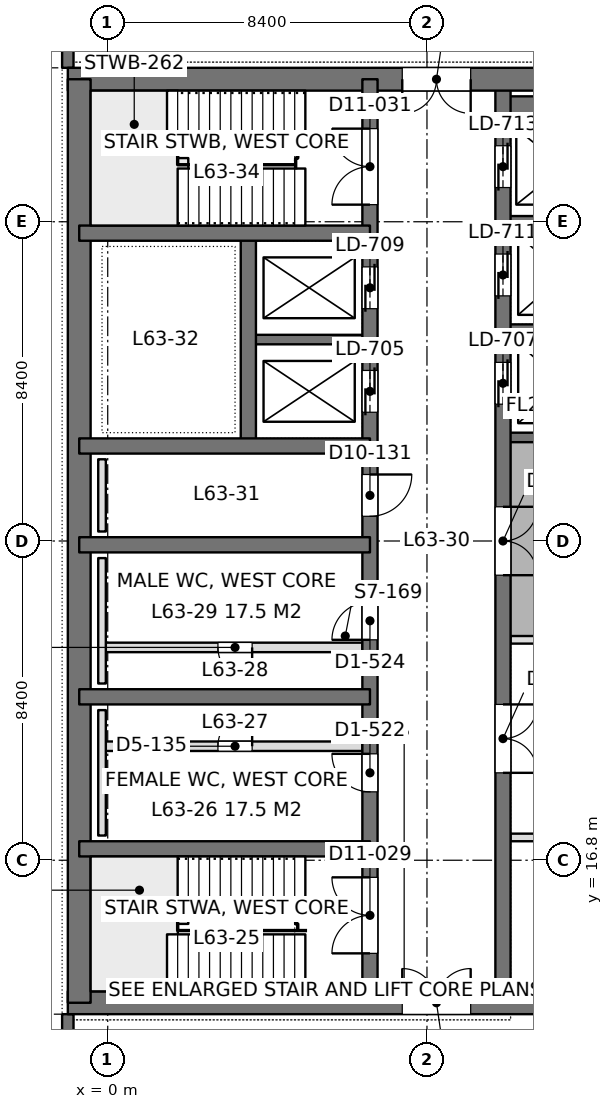
"""IFC4 building model, lengths in metres.
Left out: names, types, materials, properties, quantities, classifications, styles, units other than length and angle.
Written with IfcOpenShell. Run it as: python <this file> out.ifc"""

import sys

from ifc_helpers import new_model, si_unit, direction, frame, frame_2d, origin, place, context, subcontext, project, spatial, rectangle, extrude, element, fill, save


model = new_model("IFC4")
c1 = context("Model", 3, precision=1e-05, world=origin(), true_north=direction((0.0, 1.0)))
c2 = subcontext(c1, "Body", "Model", "MODEL_VIEW")
j1 = project(units=[si_unit("LENGTHUNIT", "METRE"), si_unit("PLANEANGLEUNIT", "RADIAN")], contexts=[c1])
p1 = place(None, origin())
s1 = spatial("IfcSite", under=j1, at=p1, CompositionType="ELEMENT")
p2 = place(p1, origin())
s2 = spatial("IfcBuilding", under=s1, at=p2, CompositionType="ELEMENT")
p3 = place(p2, frame((0.0, 0.0, 277.2)))
s3 = spatial("IfcBuildingStorey", under=s2, at=p3, CompositionType="ELEMENT", Elevation=277.2)
p4 = place(p3, frame((-1.05, 13.05, 0.0), z_axis=(0.0, 0.0, 1.0), x_axis=(1.0, 0.0, 0.0)))
e1 = element("IfcWall", 1, at=p4, inside=s3, PredefinedType="SHEAR", context=c2, shape_type="SweptSolid", body=[
    extrude(rectangle(XDim=17.7, YDim=0.6, at=frame_2d((8.85, 0.0))), origin(), (0.0, 0.0, 1.0), 4.5),
])
p5 = place(p4, frame((8.8, 0.0, 0.0)))
e2 = element("IfcOpeningElement", 2, at=p5, cuts=e1, PredefinedType="OPENING", context=c2, shape_type="SweptSolid", body=[
    extrude(rectangle(XDim=1.8, YDim=2.4, at=frame_2d((0.9, 1.2))), frame((0.0, 0.31, 0.0), z_axis=(0.0, -1.0, 0.0), x_axis=(1.0, 0.0, 0.0)), (0.0, 0.0, 1.0), 0.62),
])
p6 = place(p3, frame((-1.05, 37.35, 0.0), z_axis=(0.0, 0.0, 1.0), x_axis=(1.0, 0.0, 0.0)))
e3 = element("IfcWall", 3, at=p6, inside=s3, PredefinedType="SHEAR", context=c2, shape_type="SweptSolid", body=[
    extrude(rectangle(XDim=17.7, YDim=0.6, at=frame_2d((8.85, 0.0))), origin(), (0.0, 0.0, 1.0), 4.5),
])
p7 = place(p6, frame((8.8, 0.0, 0.0)))
e4 = element("IfcOpeningElement", 4, at=p7, cuts=e3, PredefinedType="OPENING", context=c2, shape_type="SweptSolid", body=[
    extrude(rectangle(XDim=1.8, YDim=2.4, at=frame_2d((0.9, 1.2))), frame((0.0, 0.31, 0.0), z_axis=(0.0, -1.0, 0.0), x_axis=(1.0, 0.0, 0.0)), (0.0, 0.0, 1.0), 0.62),
])
p8 = place(p3, frame((-0.75, 13.05, 0.0), z_axis=(0.0, 0.0, 1.0), x_axis=(0.0, 1.0, 0.0)))
e5 = element("IfcWall", 5, at=p8, inside=s3, PredefinedType="SHEAR", context=c2, shape_type="SweptSolid", body=[
    extrude(rectangle(XDim=24.3, YDim=0.6, at=frame_2d((12.15, 0.0))), origin(), (0.0, 0.0, 1.0), 4.5),
])
p9 = place(p3, frame((6.9, 13.05, 0.0), z_axis=(0.0, 0.0, 1.0), x_axis=(0.0, 1.0, 0.0)))
e6 = element("IfcWall", 6, at=p9, inside=s3, PredefinedType="SHEAR", context=c2, shape_type="SweptSolid", body=[
    extrude(rectangle(XDim=24.3, YDim=0.4, at=frame_2d((12.15, 0.0))), origin(), (0.0, 0.0, 1.0), 4.5),
])
p10 = place(p9, frame((1.3, 0.0, 0.0)))
e7 = element("IfcOpeningElement", 7, at=p10, cuts=e6, PredefinedType="OPENING", context=c2, shape_type="SweptSolid", body=[
    extrude(rectangle(XDim=2.0, YDim=2.2, at=frame_2d((1.0, 1.1))), frame((0.0, 0.21, 0.0), z_axis=(0.0, -1.0, 0.0), x_axis=(1.0, 0.0, 0.0)), (0.0, 0.0, 1.0), 0.42),
])
p11 = place(p9, frame((21.0, 0.0, 0.0)))
e8 = element("IfcOpeningElement", 8, at=p11, cuts=e6, PredefinedType="OPENING", context=c2, shape_type="SweptSolid", body=[
    extrude(rectangle(XDim=2.0, YDim=2.2, at=frame_2d((1.0, 1.1))), frame((0.0, 0.21, 0.0), z_axis=(0.0, -1.0, 0.0), x_axis=(1.0, 0.0, 0.0)), (0.0, 0.0, 1.0), 0.42),
])
p12 = place(p9, frame((5.55, 0.0, 0.0)))
e9 = element("IfcOpeningElement", 9, at=p12, cuts=e6, PredefinedType="OPENING", context=c2, shape_type="SweptSolid", body=[
    extrude(rectangle(XDim=1.0, YDim=2.2, at=frame_2d((0.5, 1.1))), frame((0.0, 0.21, 0.0), z_axis=(0.0, -1.0, 0.0), x_axis=(1.0, 0.0, 0.0)), (0.0, 0.0, 1.0), 0.42),
])
p13 = place(p9, frame((9.55, 0.0, 0.0)))
e10 = element("IfcOpeningElement", 10, at=p13, cuts=e6, PredefinedType="OPENING", context=c2, shape_type="SweptSolid", body=[
    extrude(rectangle(XDim=1.0, YDim=2.2, at=frame_2d((0.5, 1.1))), frame((0.0, 0.21, 0.0), z_axis=(0.0, -1.0, 0.0), x_axis=(1.0, 0.0, 0.0)), (0.0, 0.0, 1.0), 0.42),
])
p14 = place(p9, frame((12.8, 0.0, 0.0)))
e11 = element("IfcOpeningElement", 11, at=p14, cuts=e6, PredefinedType="OPENING", context=c2, shape_type="SweptSolid", body=[
    extrude(rectangle(XDim=1.1, YDim=2.2, at=frame_2d((0.55, 1.1))), frame((0.0, 0.21, 0.0), z_axis=(0.0, -1.0, 0.0), x_axis=(1.0, 0.0, 0.0)), (0.0, 0.0, 1.0), 0.42),
])
p15 = place(p9, frame((15.538, 0.0, 0.0)))
e12 = element("IfcOpeningElement", 12, at=p15, cuts=e6, PredefinedType="OPENING", context=c2, shape_type="SweptSolid", body=[
    extrude(rectangle(XDim=1.1, YDim=2.2, at=frame_2d((0.55, 1.1))), frame((0.0, 0.21, 0.0), z_axis=(0.0, -1.0, 0.0), x_axis=(1.0, 0.0, 0.0)), (0.0, 0.0, 1.0), 0.42),
])
p16 = place(p9, frame((18.262, 0.0, 0.0)))
e13 = element("IfcOpeningElement", 13, at=p16, cuts=e6, PredefinedType="OPENING", context=c2, shape_type="SweptSolid", body=[
    extrude(rectangle(XDim=1.1, YDim=2.2, at=frame_2d((0.55, 1.1))), frame((0.0, 0.21, 0.0), z_axis=(0.0, -1.0, 0.0), x_axis=(1.0, 0.0, 0.0)), (0.0, 0.0, 1.0), 0.42),
])
p17 = place(p3, frame((10.4, 13.05, 0.0), z_axis=(0.0, 0.0, 1.0), x_axis=(0.0, 1.0, 0.0)))
e14 = element("IfcWall", 14, at=p17, inside=s3, PredefinedType="SHEAR", context=c2, shape_type="SweptSolid", body=[
    extrude(rectangle(XDim=24.3, YDim=0.4, at=frame_2d((12.15, 0.0))), origin(), (0.0, 0.0, 1.0), 4.5),
])
p18 = place(p17, frame((15.75, 0.0, 0.0)))
e15 = element("IfcOpeningElement", 15, at=p18, cuts=e14, PredefinedType="OPENING", context=c2, shape_type="SweptSolid", body=[
    extrude(rectangle(XDim=1.1, YDim=2.2, at=frame_2d((0.55, 1.1))), frame((0.0, 0.21, 0.0), z_axis=(0.0, -1.0, 0.0), x_axis=(1.0, 0.0, 0.0)), (0.0, 0.0, 1.0), 0.42),
])
p19 = place(p17, frame((18.6, 0.0, 0.0)))
e16 = element("IfcOpeningElement", 16, at=p19, cuts=e14, PredefinedType="OPENING", context=c2, shape_type="SweptSolid", body=[
    extrude(rectangle(XDim=1.1, YDim=2.2, at=frame_2d((0.55, 1.1))), frame((0.0, 0.21, 0.0), z_axis=(0.0, -1.0, 0.0), x_axis=(1.0, 0.0, 0.0)), (0.0, 0.0, 1.0), 0.42),
])
p20 = place(p17, frame((21.45, 0.0, 0.0)))
e17 = element("IfcOpeningElement", 17, at=p20, cuts=e14, PredefinedType="OPENING", context=c2, shape_type="SweptSolid", body=[
    extrude(rectangle(XDim=1.1, YDim=2.2, at=frame_2d((0.55, 1.1))), frame((0.0, 0.21, 0.0), z_axis=(0.0, -1.0, 0.0), x_axis=(1.0, 0.0, 0.0)), (0.0, 0.0, 1.0), 0.42),
])
p21 = place(p17, frame((6.05, 0.0, 0.0)))
e18 = element("IfcOpeningElement", 18, at=p21, cuts=e14, PredefinedType="OPENING", context=c2, shape_type="SweptSolid", body=[
    extrude(rectangle(XDim=1.8, YDim=2.4, at=frame_2d((0.9, 1.2))), frame((0.0, 0.21, 0.0), z_axis=(0.0, -1.0, 0.0), x_axis=(1.0, 0.0, 0.0)), (0.0, 0.0, 1.0), 0.42),
])
p22 = place(p17, frame((11.25, 0.0, 0.0)))
e19 = element("IfcOpeningElement", 19, at=p22, cuts=e14, PredefinedType="OPENING", context=c2, shape_type="SweptSolid", body=[
    extrude(rectangle(XDim=1.8, YDim=2.4, at=frame_2d((0.9, 1.2))), frame((0.0, 0.21, 0.0), z_axis=(0.0, -1.0, 0.0), x_axis=(1.0, 0.0, 0.0)), (0.0, 0.0, 1.0), 0.42),
])
for number, where, z_axis, x_axis in (
    (20, (-0.75, 17.1, 0.0), (0.0, 0.0, 1.0), (1.0, 0.0, 0.0)),
    (21, (-0.75, 21.1, 0.0), (0.0, 0.0, 1.0), (1.0, 0.0, 0.0)),
    (22, (-0.75, 25.1, 0.0), (0.0, 0.0, 1.0), (1.0, 0.0, 0.0)),
    (23, (-0.75, 27.7, 0.0), (0.0, 0.0, 1.0), (1.0, 0.0, 0.0)),
    (24, (-0.75, 33.3, 0.0), (0.0, 0.0, 1.0), (1.0, 0.0, 0.0)),
):
    element("IfcWall", number, at=place(p3, frame(where, z_axis=z_axis, x_axis=x_axis)), inside=s3, PredefinedType="SHEAR", context=c2, shape_type="SweptSolid", body=[
        extrude(rectangle(XDim=7.65, YDim=0.4, at=frame_2d((3.825, 0.0))), origin(), (0.0, 0.0, 1.0), 4.5),
    ])
p23 = place(p3, frame((3.7, 27.7, 0.0), z_axis=(0.0, 0.0, 1.0), x_axis=(0.0, 1.0, 0.0)))
e25 = element("IfcWall", 25, at=p23, inside=s3, PredefinedType="SHEAR", context=c2, shape_type="SweptSolid", body=[
    extrude(rectangle(XDim=5.6, YDim=0.4, at=frame_2d((2.8, 0.0))), origin(), (0.0, 0.0, 1.0), 4.5),
])
p24 = place(p3, frame((3.7, 30.5, 0.0), z_axis=(0.0, 0.0, 1.0), x_axis=(1.0, 0.0, 0.0)))
e26 = element("IfcWall", 26, at=p24, inside=s3, PredefinedType="SHEAR", context=c2, shape_type="SweptSolid", body=[
    extrude(rectangle(XDim=3.2, YDim=0.25, at=frame_2d((1.6, 0.0))), origin(), (0.0, 0.0, 1.0), 4.5),
])
p25 = place(p3, frame((10.4, 27.925, 0.0), z_axis=(0.0, 0.0, 1.0), x_axis=(1.0, 0.0, 0.0)))
e27 = element("IfcWall", 27, at=p25, inside=s3, PredefinedType="SHEAR", context=c2, shape_type="SweptSolid", body=[
    extrude(rectangle(XDim=5.95, YDim=0.25, at=frame_2d((2.975, 0.0))), origin(), (0.0, 0.0, 1.0), 4.5),
])
for number, where, z_axis, x_axis in (
    (28, (10.4, 30.775, 0.0), (0.0, 0.0, 1.0), (1.0, 0.0, 0.0)),
    (29, (10.4, 33.625, 0.0), (0.0, 0.0, 1.0), (1.0, 0.0, 0.0)),
):
    element("IfcWall", number, at=place(p3, frame(where, z_axis=z_axis, x_axis=x_axis)), inside=s3, PredefinedType="SHEAR", context=c2, shape_type="SweptSolid", body=[
        extrude(rectangle(XDim=3.2, YDim=0.25, at=frame_2d((1.6, 0.0))), origin(), (0.0, 0.0, 1.0), 4.5),
    ])
p26 = place(p3, frame((10.4, 36.625, 0.0), z_axis=(0.0, 0.0, 1.0), x_axis=(1.0, 0.0, 0.0)))
e30 = element("IfcWall", 30, at=p26, inside=s3, PredefinedType="SHEAR", context=c2, shape_type="SweptSolid", body=[
    extrude(rectangle(XDim=3.2, YDim=0.55, at=frame_2d((1.6, 0.0))), origin(), (0.0, 0.0, 1.0), 4.5),
])
p27 = place(p3, frame((-1.05, 8.4, 0.0), z_axis=(0.0, 0.0, 1.0), x_axis=(0.0, 1.0, 0.0)))
e31 = element("IfcWall", 31, at=p27, inside=s3, PredefinedType="SOLIDWALL", context=c2, shape_type="SweptSolid", body=[
    extrude(rectangle(XDim=4.35, YDim=0.3, at=frame_2d((2.175, 0.0))), origin(), (0.0, 0.0, 1.0), 4.3),
])
p28 = place(p27, frame((0.975, 0.0, 0.9)))
e32 = element("IfcOpeningElement", 32, at=p28, cuts=e31, PredefinedType="OPENING", context=c2, shape_type="SweptSolid", body=[
    extrude(rectangle(XDim=2.4, YDim=1.9, at=frame_2d((1.2, 0.95))), frame((0.0, 0.16, 0.0), z_axis=(0.0, -1.0, 0.0), x_axis=(1.0, 0.0, 0.0)), (0.0, 0.0, 1.0), 0.32),
])
p29 = place(p3, frame((-1.05, 37.65, 0.0), z_axis=(0.0, 0.0, 1.0), x_axis=(0.0, 1.0, 0.0)))
e33 = element("IfcWall", 33, at=p29, inside=s3, PredefinedType="SOLIDWALL", context=c2, shape_type="SweptSolid", body=[
    extrude(rectangle(XDim=4.35, YDim=0.3, at=frame_2d((2.175, 0.0))), origin(), (0.0, 0.0, 1.0), 4.3),
])
p30 = place(p29, frame((0.975, 0.0, 0.9)))
e34 = element("IfcOpeningElement", 34, at=p30, cuts=e33, PredefinedType="OPENING", context=c2, shape_type="SweptSolid", body=[
    extrude(rectangle(XDim=2.4, YDim=1.9, at=frame_2d((1.2, 0.95))), frame((0.0, 0.16, 0.0), z_axis=(0.0, -1.0, 0.0), x_axis=(1.0, 0.0, 0.0)), (0.0, 0.0, 1.0), 0.32),
])
p31 = place(p3, frame((10.598, 17.4, 0.0), z_axis=(0.0, 0.0, 1.0), x_axis=(1.0, 0.0, 0.0)))
e35 = element("IfcWall", 35, at=p31, inside=s3, PredefinedType="PARTITIONING", context=c2, shape_type="SweptSolid", body=[
    extrude(rectangle(XDim=5.904, YDim=0.2, at=frame_2d((2.952, 0.0))), origin(), (0.0, 0.0, 1.0), 3.292),
])
p32 = place(p3, frame((10.598, 22.6, 0.0), z_axis=(0.0, 0.0, 1.0), x_axis=(1.0, 0.0, 0.0)))
e36 = element("IfcWall", 36, at=p32, inside=s3, PredefinedType="PARTITIONING", context=c2, shape_type="SweptSolid", body=[
    extrude(rectangle(XDim=5.053, YDim=0.2, at=frame_2d((2.526, 0.0))), origin(), (0.0, 0.0, 1.0), 4.3),
])
p33 = place(p3, frame((-0.05, 22.4, 0.0), z_axis=(0.0, 0.0, 1.0), x_axis=(1.0, 0.0, 0.0)))
e37 = element("IfcWall", 37, at=p33, inside=s3, PredefinedType="PARTITIONING", context=c2, shape_type="SweptSolid", body=[
    extrude(rectangle(XDim=6.75, YDim=0.25, at=frame_2d((3.375, 0.0))), origin(), (0.0, 0.0, 1.0), 4.3),
])
p34 = place(p33, frame((2.95, 0.0, 0.0)))
e38 = element("IfcOpeningElement", 38, at=p34, cuts=e37, PredefinedType="OPENING", context=c2, shape_type="SweptSolid", body=[
    extrude(rectangle(XDim=0.9, YDim=2.2, at=frame_2d((0.45, 1.1))), frame((0.0, 0.135, 0.0), z_axis=(0.0, -1.0, 0.0), x_axis=(1.0, 0.0, 0.0)), (0.0, 0.0, 1.0), 0.27),
])
p35 = place(p3, frame((-0.05, 19.8, 0.0), z_axis=(0.0, 0.0, 1.0), x_axis=(1.0, 0.0, 0.0)))
e39 = element("IfcWall", 39, at=p35, inside=s3, PredefinedType="PARTITIONING", context=c2, shape_type="SweptSolid", body=[
    extrude(rectangle(XDim=6.75, YDim=0.25, at=frame_2d((3.375, 0.0))), origin(), (0.0, 0.0, 1.0), 4.3),
])
p36 = place(p35, frame((2.95, 0.0, 0.0)))
e40 = element("IfcOpeningElement", 40, at=p36, cuts=e39, PredefinedType="OPENING", context=c2, shape_type="SweptSolid", body=[
    extrude(rectangle(XDim=0.9, YDim=2.2, at=frame_2d((0.45, 1.1))), frame((0.0, 0.135, 0.0), z_axis=(0.0, -1.0, 0.0), x_axis=(1.0, 0.0, 0.0)), (0.0, 0.0, 1.0), 0.27),
])
for number, where, z_axis, x_axis in (
    (41, (-0.15, 17.45, 0.0), (0.0, 0.0, 1.0), (0.0, 1.0, 0.0)),
    (42, (-0.15, 21.45, 0.0), (0.0, 0.0, 1.0), (0.0, 1.0, 0.0)),
):
    element("IfcWall", number, at=place(p3, frame(where, z_axis=z_axis, x_axis=x_axis)), inside=s3, PredefinedType="PLUMBINGWALL", context=c2, shape_type="SweptSolid", body=[
        extrude(rectangle(XDim=3.3, YDim=0.2, at=frame_2d((1.65, 0.0))), origin(), (0.0, 0.0, 1.0), 1.2),
    ])
p37 = place(p3, frame((-0.15, 25.45, 0.0), z_axis=(0.0, 0.0, 1.0), x_axis=(0.0, 1.0, 0.0)))
e43 = element("IfcWall", 43, at=p37, inside=s3, PredefinedType="PLUMBINGWALL", context=c2, shape_type="SweptSolid", body=[
    extrude(rectangle(XDim=1.9, YDim=0.2, at=frame_2d((0.95, 0.0))), origin(), (0.0, 0.0, 1.0), 1.2),
])
p38 = place(p5, origin())
e44 = element("IfcDoor", 44, at=p38, inside=s3, OperationType="DOUBLE_DOOR_SINGLE_SWING", PredefinedType="DOOR", context=c2, shape_type="SweptSolid", body=[
    extrude(rectangle(XDim=1.8, YDim=2.4, at=frame_2d((0.9, 1.2))), frame((0.0, 0.025, 0.0), z_axis=(0.0, -1.0, 0.0), x_axis=(1.0, 0.0, 0.0)), (0.0, 0.0, 1.0), 0.05),
])
fill(e2, e44)
p39 = place(p7, frame((1.8, 0.0, 0.0), z_axis=(0.0, 0.0, 1.0), x_axis=(-1.0, 0.0, 0.0)))
e45 = element("IfcDoor", 45, at=p39, inside=s3, OperationType="DOUBLE_DOOR_SINGLE_SWING", PredefinedType="DOOR", context=c2, shape_type="SweptSolid", body=[
    extrude(rectangle(XDim=1.8, YDim=2.4, at=frame_2d((0.9, 1.2))), frame((0.0, 0.025, 0.0), z_axis=(0.0, -1.0, 0.0), x_axis=(1.0, 0.0, 0.0)), (0.0, 0.0, 1.0), 0.05),
])
fill(e4, e45)
p40 = place(p10, origin())
e46 = element("IfcDoor", 46, at=p40, inside=s3, OperationType="DOUBLE_DOOR_SINGLE_SWING", PredefinedType="DOOR", context=c2, shape_type="SweptSolid", body=[
    extrude(rectangle(XDim=2.0, YDim=2.2, at=frame_2d((1.0, 1.1))), frame((0.0, 0.025, 0.0), z_axis=(0.0, -1.0, 0.0), x_axis=(1.0, 0.0, 0.0)), (0.0, 0.0, 1.0), 0.05),
])
fill(e7, e46)
p41 = place(p11, origin())
e47 = element("IfcDoor", 47, at=p41, inside=s3, OperationType="DOUBLE_DOOR_SINGLE_SWING", PredefinedType="DOOR", context=c2, shape_type="SweptSolid", body=[
    extrude(rectangle(XDim=2.0, YDim=2.2, at=frame_2d((1.0, 1.1))), frame((0.0, 0.025, 0.0), z_axis=(0.0, -1.0, 0.0), x_axis=(1.0, 0.0, 0.0)), (0.0, 0.0, 1.0), 0.05),
])
fill(e8, e47)
p42 = place(p12, origin())
e48 = element("IfcDoor", 48, at=p42, inside=s3, OperationType="SINGLE_SWING_RIGHT", PredefinedType="DOOR", context=c2, shape_type="SweptSolid", body=[
    extrude(rectangle(XDim=1.0, YDim=2.2, at=frame_2d((0.5, 1.1))), frame((0.0, 0.025, 0.0), z_axis=(0.0, -1.0, 0.0), x_axis=(1.0, 0.0, 0.0)), (0.0, 0.0, 1.0), 0.05),
])
fill(e9, e48)
p43 = place(p13, origin())
e49 = element("IfcDoor", 49, at=p43, inside=s3, OperationType="SINGLE_SWING_LEFT", PredefinedType="DOOR", context=c2, shape_type="SweptSolid", body=[
    extrude(rectangle(XDim=1.0, YDim=2.2, at=frame_2d((0.5, 1.1))), frame((0.0, 0.025, 0.0), z_axis=(0.0, -1.0, 0.0), x_axis=(1.0, 0.0, 0.0)), (0.0, 0.0, 1.0), 0.05),
])
fill(e10, e49)
p44 = place(p14, frame((1.1, 0.0, 0.0), z_axis=(0.0, 0.0, 1.0), x_axis=(-1.0, 0.0, 0.0)))
e50 = element("IfcDoor", 50, at=p44, inside=s3, OperationType="SINGLE_SWING_LEFT", PredefinedType="DOOR", context=c2, shape_type="SweptSolid", body=[
    extrude(rectangle(XDim=1.1, YDim=2.2, at=frame_2d((0.55, 1.1))), frame((0.0, 0.025, 0.0), z_axis=(0.0, -1.0, 0.0), x_axis=(1.0, 0.0, 0.0)), (0.0, 0.0, 1.0), 0.05),
])
fill(e11, e50)
p45 = place(p18, origin())
e51 = element("IfcDoor", 51, at=p45, inside=s3, OperationType="DOUBLE_DOOR_SLIDING", PredefinedType="DOOR", context=c2, shape_type="SweptSolid", body=[
    extrude(rectangle(XDim=1.1, YDim=2.2, at=frame_2d((0.55, 1.1))), frame((0.0, 0.025, 0.0), z_axis=(0.0, -1.0, 0.0), x_axis=(1.0, 0.0, 0.0)), (0.0, 0.0, 1.0), 0.05),
])
fill(e15, e51)
p46 = place(p19, origin())
e52 = element("IfcDoor", 52, at=p46, inside=s3, OperationType="DOUBLE_DOOR_SLIDING", PredefinedType="DOOR", context=c2, shape_type="SweptSolid", body=[
    extrude(rectangle(XDim=1.1, YDim=2.2, at=frame_2d((0.55, 1.1))), frame((0.0, 0.025, 0.0), z_axis=(0.0, -1.0, 0.0), x_axis=(1.0, 0.0, 0.0)), (0.0, 0.0, 1.0), 0.05),
])
fill(e16, e52)
p47 = place(p20, origin())
e53 = element("IfcDoor", 53, at=p47, inside=s3, OperationType="DOUBLE_DOOR_SLIDING", PredefinedType="DOOR", context=c2, shape_type="SweptSolid", body=[
    extrude(rectangle(XDim=1.1, YDim=2.2, at=frame_2d((0.55, 1.1))), frame((0.0, 0.025, 0.0), z_axis=(0.0, -1.0, 0.0), x_axis=(1.0, 0.0, 0.0)), (0.0, 0.0, 1.0), 0.05),
])
fill(e17, e53)
p48 = place(p15, origin())
e54 = element("IfcDoor", 54, at=p48, inside=s3, OperationType="DOUBLE_DOOR_SLIDING", PredefinedType="DOOR", context=c2, shape_type="SweptSolid", body=[
    extrude(rectangle(XDim=1.1, YDim=2.2, at=frame_2d((0.55, 1.1))), frame((0.0, 0.025, 0.0), z_axis=(0.0, -1.0, 0.0), x_axis=(1.0, 0.0, 0.0)), (0.0, 0.0, 1.0), 0.05),
])
fill(e12, e54)
p49 = place(p16, origin())
e55 = element("IfcDoor", 55, at=p49, inside=s3, OperationType="DOUBLE_DOOR_SLIDING", PredefinedType="DOOR", context=c2, shape_type="SweptSolid", body=[
    extrude(rectangle(XDim=1.1, YDim=2.2, at=frame_2d((0.55, 1.1))), frame((0.0, 0.025, 0.0), z_axis=(0.0, -1.0, 0.0), x_axis=(1.0, 0.0, 0.0)), (0.0, 0.0, 1.0), 0.05),
])
fill(e13, e55)
p50 = place(p21, frame((1.8, 0.0, 0.0), z_axis=(0.0, 0.0, 1.0), x_axis=(-1.0, 0.0, 0.0)))
e56 = element("IfcDoor", 56, at=p50, inside=s3, OperationType="DOUBLE_DOOR_SINGLE_SWING", PredefinedType="DOOR", context=c2, shape_type="SweptSolid", body=[
    extrude(rectangle(XDim=1.8, YDim=2.4, at=frame_2d((0.9, 1.2))), frame((0.0, 0.025, 0.0), z_axis=(0.0, -1.0, 0.0), x_axis=(1.0, 0.0, 0.0)), (0.0, 0.0, 1.0), 0.05),
])
fill(e18, e56)
p51 = place(p22, frame((1.8, 0.0, 0.0), z_axis=(0.0, 0.0, 1.0), x_axis=(-1.0, 0.0, 0.0)))
e57 = element("IfcDoor", 57, at=p51, inside=s3, OperationType="DOUBLE_DOOR_SINGLE_SWING", PredefinedType="DOOR", context=c2, shape_type="SweptSolid", body=[
    extrude(rectangle(XDim=1.8, YDim=2.4, at=frame_2d((0.9, 1.2))), frame((0.0, 0.025, 0.0), z_axis=(0.0, -1.0, 0.0), x_axis=(1.0, 0.0, 0.0)), (0.0, 0.0, 1.0), 0.05),
])
fill(e19, e57)
p52 = place(p34, frame((0.9, 0.0, 0.0), z_axis=(0.0, 0.0, 1.0), x_axis=(-1.0, 0.0, 0.0)))
e58 = element("IfcDoor", 58, at=p52, inside=s3, OperationType="SINGLE_SWING_LEFT", PredefinedType="DOOR", context=c2, shape_type="SweptSolid", body=[
    extrude(rectangle(XDim=0.9, YDim=2.2, at=frame_2d((0.45, 1.1))), frame((0.0, 0.025, 0.0), z_axis=(0.0, -1.0, 0.0), x_axis=(1.0, 0.0, 0.0)), (0.0, 0.0, 1.0), 0.05),
])
fill(e38, e58)
p53 = place(p36, origin())
e59 = element("IfcDoor", 59, at=p53, inside=s3, OperationType="SINGLE_SWING_RIGHT", PredefinedType="DOOR", context=c2, shape_type="SweptSolid", body=[
    extrude(rectangle(XDim=0.9, YDim=2.2, at=frame_2d((0.45, 1.1))), frame((0.0, 0.025, 0.0), z_axis=(0.0, -1.0, 0.0), x_axis=(1.0, 0.0, 0.0)), (0.0, 0.0, 1.0), 0.05),
])
fill(e40, e59)
save(model, sys.argv[1])
